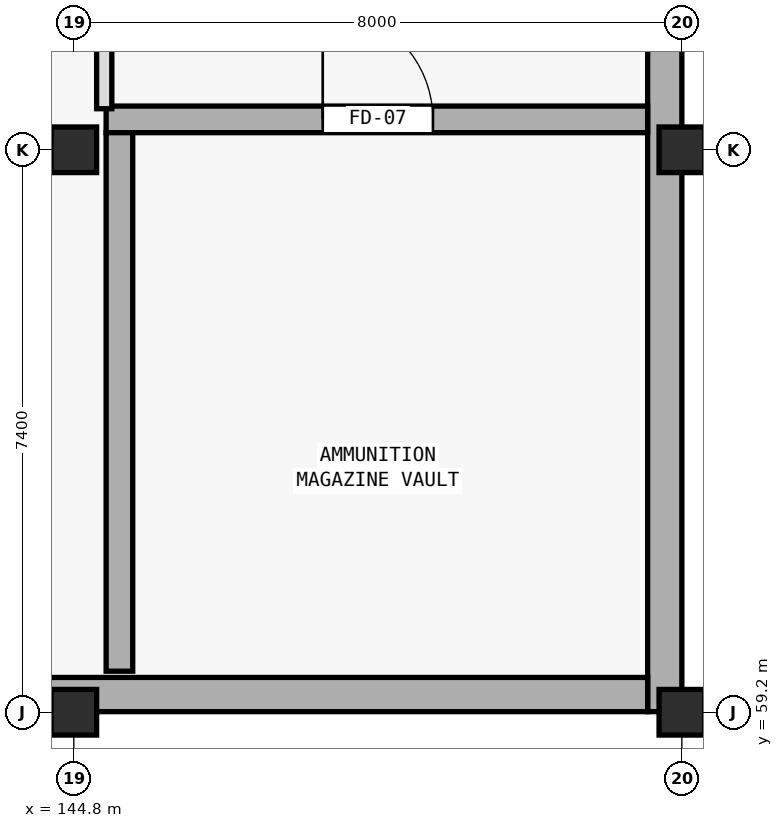
"""IFC4 building model, lengths in metres.
Left out: names, types, materials, properties, quantities, classifications, styles, units other than length and angle.
Written with IfcOpenShell. Run it as: python <this file> out.ifc"""

import sys

from ifc_helpers import new_model, si_unit, direction, frame, frame_2d, origin, origin_2d, place, context, subcontext, project, spatial, rectangle, extrude, element, fill, save


model = new_model("IFC4")
c1 = context("Model", 3, precision=1e-05, world=origin(), true_north=direction((0.0, 1.0)))
c2 = subcontext(c1, "Body", "Model", "MODEL_VIEW")
j1 = project(units=[si_unit("LENGTHUNIT", "METRE"), si_unit("PLANEANGLEUNIT", "RADIAN")], contexts=[c1])
p1 = place(None, origin())
s1 = spatial("IfcSite", under=j1, at=p1, CompositionType="ELEMENT")
p2 = place(p1, origin())
s2 = spatial("IfcBuilding", under=s1, at=p2, CompositionType="ELEMENT")
p3 = place(p2, frame((0.0, 0.0, -4.8)))
s3 = spatial("IfcBuildingStorey", under=s2, at=p3, CompositionType="ELEMENT", Elevation=-4.8)
p4 = place(p3, frame((152.575, 110.55, 0.0), z_axis=(0.0, 0.0, 1.0), x_axis=(0.0, -1.0, 0.0)))
e1 = element("IfcWall", 1, at=p4, inside=s3, PredefinedType="SOLIDWALL", context=c2, shape_type="SweptSolid", body=[
    extrude(rectangle(XDim=51.342, YDim=0.45, at=frame_2d((25.671, 0.0))), origin(), (0.0, 0.0, 1.0), 4.38),
])
p5 = place(p3, frame((152.35, 59.433, 0.0), z_axis=(0.0, 0.0, 1.0), x_axis=(-1.0, 0.0, 0.0)))
e2 = element("IfcWall", 2, at=p5, inside=s3, PredefinedType="SOLIDWALL", context=c2, shape_type="SweptSolid", body=[
    extrude(rectangle(XDim=48.0, YDim=0.45, at=frame_2d((24.0, 0.0))), origin(), (0.0, 0.0, 1.0), 4.38),
])
for number, where, z_axis, x_axis in (
    (3, (144.8, 59.2, 0.0), (0.0, 0.0, 1.0), (1.0, 0.0, 0.0)),
    (4, (144.8, 66.6, 0.0), (0.0, 0.0, 1.0), (1.0, 0.0, 0.0)),
    (5, (152.8, 59.2, 0.0), (0.0, 0.0, 1.0), (1.0, 0.0, 0.0)),
    (6, (152.8, 66.6, 0.0), (0.0, 0.0, 1.0), (1.0, 0.0, 0.0)),
):
    element("IfcColumn", number, at=place(p3, frame(where, z_axis=z_axis, x_axis=x_axis)), inside=s3, PredefinedType="COLUMN", context=c2, shape_type="SweptSolid", body=[
        extrude(rectangle(XDim=0.6, YDim=0.6, at=origin_2d()), origin(), (0.0, 0.0, 1.0), 4.8),
    ])
p6 = place(p3, frame((145.225, 67.0, 0.0), z_axis=(0.0, 0.0, 1.0), x_axis=(1.0, 0.0, 0.0)))
e7 = element("IfcWall", 7, at=p6, inside=s3, PredefinedType="SOLIDWALL", context=c2, shape_type="SweptSolid", body=[
    extrude(rectangle(XDim=7.125, YDim=0.35, at=frame_2d((3.562, 0.0))), origin(), (0.0, 0.0, 1.0), 3.63),
])
p7 = place(p6, frame((2.85, 0.0, 0.0)))
e8 = element("IfcOpeningElement", 8, at=p7, cuts=e7, PredefinedType="OPENING", context=c2, shape_type="SweptSolid", body=[
    extrude(rectangle(XDim=1.45, YDim=2.3, at=frame_2d((0.725, 1.15))), frame((0.0, 0.185, 0.0), z_axis=(0.0, -1.0, 0.0), x_axis=(1.0, 0.0, 0.0)), (0.0, 0.0, 1.0), 0.37),
])
p8 = place(p3, frame((145.4, 59.74, 0.0), z_axis=(0.0, 0.0, 1.0), x_axis=(0.0, 1.0, 0.0)))
e9 = element("IfcWall", 9, at=p8, inside=s3, PredefinedType="SOLIDWALL", context=c2, shape_type="SweptSolid", body=[
    extrude(rectangle(XDim=7.085, YDim=0.35, at=frame_2d((3.542, 0.0))), origin(), (0.0, 0.0, 1.0), 3.63),
])
p9 = place(p3, frame((145.2, 67.14, 0.0), z_axis=(0.0, 0.0, 1.0), x_axis=(0.0, 1.0, 0.0)))
e10 = element("IfcWall", 10, at=p9, inside=s3, PredefinedType="STANDARD", context=c2, shape_type="SweptSolid", body=[
    extrude(rectangle(XDim=43.12, YDim=0.2, at=frame_2d((21.56, 0.0))), origin(), (0.0, 0.0, 1.0), 3.51),
])
p10 = place(p9, frame((32.884, 0.0, 0.0)))
e11 = element("IfcOpeningElement", 11, at=p10, cuts=e10, PredefinedType="OPENING", context=c2, shape_type="SweptSolid", body=[
    extrude(rectangle(XDim=1.5, YDim=2.3, at=frame_2d((0.75, 1.15))), frame((0.0, 0.11, 0.0), z_axis=(0.0, -1.0, 0.0), x_axis=(1.0, 0.0, 0.0)), (0.0, 0.0, 1.0), 0.22),
])
p11 = place(p7, origin())
e12 = element("IfcDoor", 12, at=p11, inside=s3, OperationType="SINGLE_SWING_LEFT", PredefinedType="DOOR", context=c2, shape_type="SweptSolid", body=[
    extrude(rectangle(XDim=1.45, YDim=2.3, at=frame_2d((0.725, 1.15))), frame((0.0, 0.025, 0.0), z_axis=(0.0, -1.0, 0.0), x_axis=(1.0, 0.0, 0.0)), (0.0, 0.0, 1.0), 0.05),
])
fill(e8, e12)
save(model, sys.argv[1])
